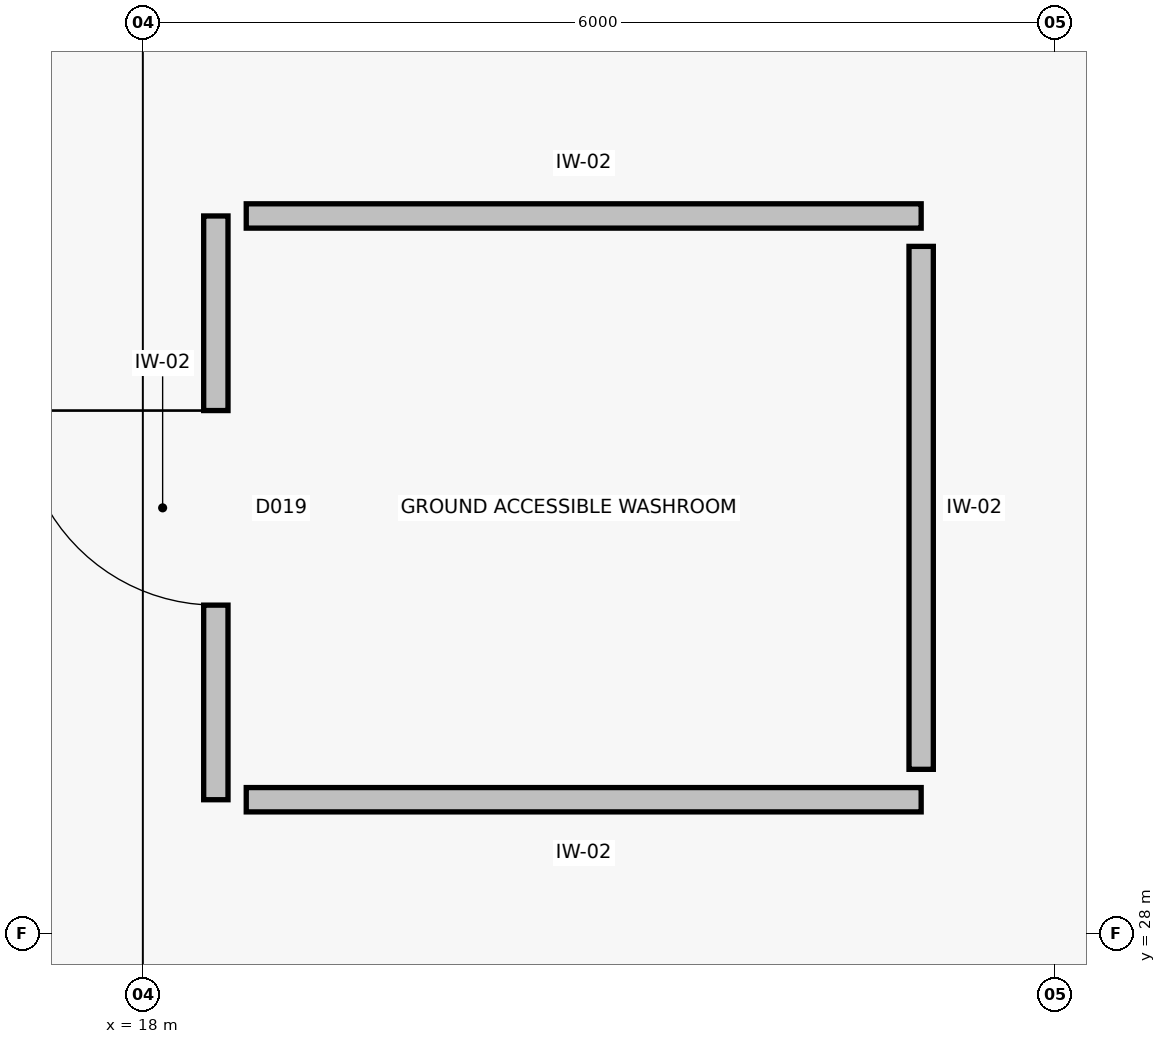
"""IFC4 building model, lengths in metres.
Left out: names, types, materials, properties, quantities, classifications, styles, units other than length and angle.
Written with IfcOpenShell. Run it as: python <this file> out.ifc"""

import sys

from ifc_helpers import new_model, si_unit, direction, frame, frame_2d, origin, origin_2d, place, context, subcontext, project, spatial, rectangle, extrude, element, fill, save


model = new_model("IFC4")
c1 = context("Model", 3, precision=1e-05, world=origin(), true_north=direction((0.0, 1.0)))
c2 = subcontext(c1, "Body", "Model", "MODEL_VIEW")
j1 = project(units=[si_unit("LENGTHUNIT", "METRE"), si_unit("PLANEANGLEUNIT", "RADIAN")], contexts=[c1])
p1 = place(None, origin())
s1 = spatial("IfcSite", under=j1, at=p1, CompositionType="ELEMENT")
p2 = place(p1, origin())
s2 = spatial("IfcBuilding", under=s1, at=p2, CompositionType="ELEMENT")
p3 = place(p2, origin())
s3 = spatial("IfcBuildingStorey", under=s2, at=p3, CompositionType="ELEMENT", Elevation=0.0)
for number, where, z_axis, x_axis in (
    (1, (18.0, 28.0, 0.0), (0.0, 0.0, 1.0), (1.0, 0.0, 0.0)),
    (2, (18.0, 34.0, 0.0), (0.0, 0.0, 1.0), (1.0, 0.0, 0.0)),
    (3, (24.0, 28.0, 0.0), (0.0, 0.0, 1.0), (1.0, 0.0, 0.0)),
    (4, (24.0, 34.0, 0.0), (0.0, 0.0, 1.0), (1.0, 0.0, 0.0)),
):
    element("IfcColumn", number, at=place(p3, frame(where, z_axis=z_axis, x_axis=x_axis)), inside=s3, PredefinedType="COLUMN", context=c2, shape_type="SweptSolid", body=[
        extrude(rectangle(XDim=0.7, YDim=0.7, at=origin_2d()), origin(), (0.0, 0.0, 1.0), 6.6),
    ])
p4 = place(p3, frame((18.48, 28.88, 0.0), z_axis=(0.0, 0.0, 1.0), x_axis=(0.0, 1.0, 0.0)))
e5 = element("IfcWall", 5, at=p4, inside=s3, PredefinedType="PARTITIONING", context=c2, shape_type="SweptSolid", body=[
    extrude(rectangle(XDim=3.84, YDim=0.16, at=frame_2d((1.92, 0.0))), origin(), (0.0, 0.0, 1.0), 6.32),
])
p5 = place(p4, frame((1.28, 0.0, 0.0)))
e6 = element("IfcOpeningElement", 6, at=p5, cuts=e5, PredefinedType="OPENING", context=c2, shape_type="SweptSolid", body=[
    extrude(rectangle(XDim=1.28, YDim=2.2, at=frame_2d((0.64, 1.1))), frame((0.0, 0.095, 0.0), z_axis=(0.0, -1.0, 0.0), x_axis=(1.0, 0.0, 0.0)), (0.0, 0.0, 1.0), 0.19),
])
for number, where, z_axis, x_axis in (
    (7, (18.68, 32.72, 0.0), (0.0, 0.0, 1.0), (1.0, 0.0, 0.0)),
    (8, (23.12, 28.88, 0.0), (0.0, 0.0, 1.0), (-1.0, 0.0, 0.0)),
):
    element("IfcWall", number, at=place(p3, frame(where, z_axis=z_axis, x_axis=x_axis)), inside=s3, PredefinedType="PARTITIONING", context=c2, shape_type="SweptSolid", body=[
        extrude(rectangle(XDim=4.44, YDim=0.16, at=frame_2d((2.22, 0.0))), origin(), (0.0, 0.0, 1.0), 5.99),
    ])
p6 = place(p3, frame((23.12, 32.52, 0.0), z_axis=(0.0, 0.0, 1.0), x_axis=(0.0, -1.0, 0.0)))
e9 = element("IfcWall", 9, at=p6, inside=s3, PredefinedType="PARTITIONING", context=c2, shape_type="SweptSolid", body=[
    extrude(rectangle(XDim=3.44, YDim=0.16, at=frame_2d((1.72, 0.0))), origin(), (0.0, 0.0, 1.0), 6.32),
])
p7 = place(p5, origin())
e10 = element("IfcDoor", 10, at=p7, inside=s3, OperationType="SINGLE_SWING_RIGHT", PredefinedType="DOOR", context=c2, shape_type="SweptSolid", body=[
    extrude(rectangle(XDim=1.28, YDim=2.2, at=frame_2d((0.64, 1.1))), frame((0.0, 0.025, 0.0), z_axis=(0.0, -1.0, 0.0), x_axis=(1.0, 0.0, 0.0)), (0.0, 0.0, 1.0), 0.05),
])
fill(e6, e10)
save(model, sys.argv[1])
